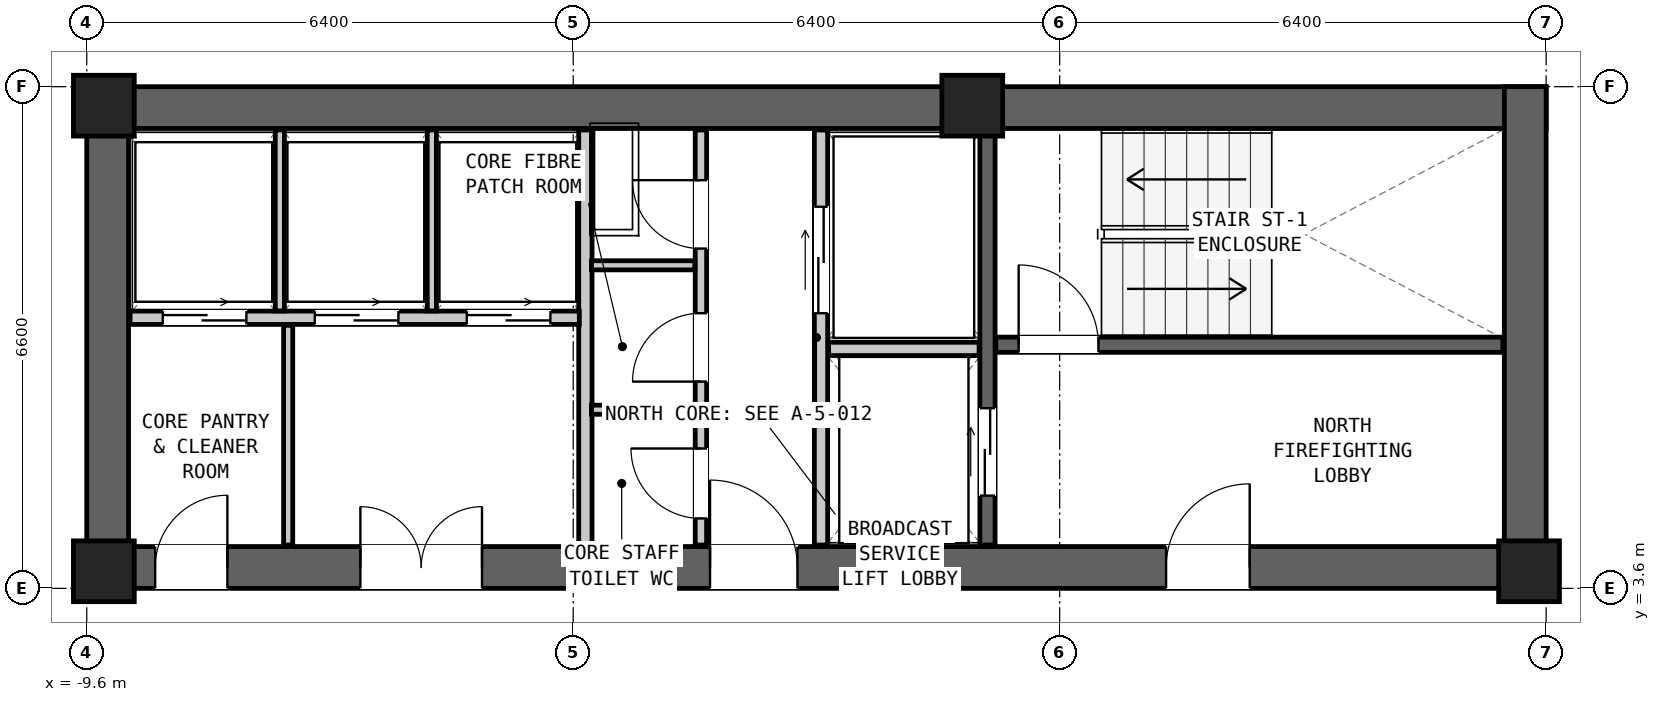
"""IFC4 building model, lengths in metres.
Left out: names, types, materials, properties, quantities, classifications, styles, units other than length and angle.
Written with IfcOpenShell. Run it as: python <this file> out.ifc"""

import sys

from ifc_helpers import new_model, si_unit, direction, frame, frame_2d, origin, origin_2d, place, context, subcontext, project, spatial, rectangle, extrude, element, fill, save


model = new_model("IFC4")
c1 = context("Model", 3, precision=1e-05, world=origin(), true_north=direction((0.0, 1.0)))
c2 = subcontext(c1, "Body", "Model", "MODEL_VIEW")
j1 = project(units=[si_unit("LENGTHUNIT", "METRE"), si_unit("PLANEANGLEUNIT", "RADIAN")], contexts=[c1])
p1 = place(None, origin())
s1 = spatial("IfcSite", under=j1, at=p1, CompositionType="ELEMENT")
p2 = place(p1, origin())
s2 = spatial("IfcBuilding", under=s1, at=p2, CompositionType="ELEMENT")
p3 = place(p2, frame((0.0, 0.0, 35.25)))
s3 = spatial("IfcBuildingStorey", under=s2, at=p3, CompositionType="ELEMENT", Elevation=35.25)
p4 = place(p3, frame((-9.6, 9.925, 0.0), z_axis=(0.0, 0.0, 1.0), x_axis=(1.0, 0.0, 0.0)))
e1 = element("IfcWall", 1, at=p4, inside=s3, PredefinedType="SHEAR", context=c2, shape_type="SweptSolid", body=[
    extrude(rectangle(XDim=19.2, YDim=0.55, at=frame_2d((9.6, 0.0))), origin(), (0.0, 0.0, 1.0), 3.05),
])
p5 = place(p3, frame((-9.6, 3.875, 0.0), z_axis=(0.0, 0.0, 1.0), x_axis=(1.0, 0.0, 0.0)))
e2 = element("IfcWall", 2, at=p5, inside=s3, PredefinedType="SHEAR", context=c2, shape_type="SweptSolid", body=[
    extrude(rectangle(XDim=19.2, YDim=0.55, at=frame_2d((9.6, 0.0))), origin(), (0.0, 0.0, 1.0), 3.05),
])
p6 = place(p5, frame((14.2, 0.0, 0.0)))
e3 = element("IfcOpeningElement", 3, at=p6, cuts=e2, PredefinedType="OPENING", context=c2, shape_type="SweptSolid", body=[
    extrude(rectangle(XDim=1.1, YDim=2.08, at=frame_2d((0.55, 1.04))), frame((0.0, 0.287, 0.0), z_axis=(0.0, -1.0, 0.0), x_axis=(1.0, 0.0, 0.0)), (0.0, 0.0, 1.0), 0.574),
])
p7 = place(p5, frame((8.2, 0.0, 0.0)))
e4 = element("IfcOpeningElement", 4, at=p7, cuts=e2, PredefinedType="OPENING", context=c2, shape_type="SweptSolid", body=[
    extrude(rectangle(XDim=1.15, YDim=2.1, at=frame_2d((0.575, 1.05))), frame((0.0, 0.287, 0.0), z_axis=(0.0, -1.0, 0.0), x_axis=(1.0, 0.0, 0.0)), (0.0, 0.0, 1.0), 0.574),
])
p8 = place(p5, frame((0.9, 0.0, 0.0)))
e5 = element("IfcOpeningElement", 5, at=p8, cuts=e2, PredefinedType="OPENING", context=c2, shape_type="SweptSolid", body=[
    extrude(rectangle(XDim=0.95, YDim=2.1, at=frame_2d((0.475, 1.05))), frame((0.0, 0.287, 0.0), z_axis=(0.0, -1.0, 0.0), x_axis=(1.0, 0.0, 0.0)), (0.0, 0.0, 1.0), 0.574),
])
p9 = place(p5, frame((3.6, 0.0, 0.0)))
e6 = element("IfcOpeningElement", 6, at=p9, cuts=e2, PredefinedType="OPENING", context=c2, shape_type="SweptSolid", body=[
    extrude(rectangle(XDim=1.6, YDim=2.12, at=frame_2d((0.8, 1.06))), frame((0.0, 0.287, 0.0), z_axis=(0.0, -1.0, 0.0), x_axis=(1.0, 0.0, 0.0)), (0.0, 0.0, 1.0), 0.574),
])
for number, where, z_axis, x_axis in (
    (7, (-9.325, 3.6, 0.0), (0.0, 0.0, 1.0), (0.0, 1.0, 0.0)),
    (8, (9.325, 3.6, 0.0), (0.0, 0.0, 1.0), (0.0, 1.0, 0.0)),
):
    element("IfcWall", number, at=place(p3, frame(where, z_axis=z_axis, x_axis=x_axis)), inside=s3, PredefinedType="SHEAR", context=c2, shape_type="SweptSolid", body=[
        extrude(rectangle(XDim=6.6, YDim=0.55, at=frame_2d((3.3, 0.0))), origin(), (0.0, 0.0, 1.0), 3.05),
    ])
for number, where, z_axis, x_axis in (
    (9, (-9.375, 9.95, 0.0), (0.0, 0.0, 1.0), (1.0, 0.0, 0.0)),
    (10, (2.05, 9.95, 0.0), (0.0, 0.0, 1.0), (1.0, 0.0, 0.0)),
    (11, (-9.375, 3.825, 0.0), (0.0, 0.0, 1.0), (1.0, 0.0, 0.0)),
    (12, (9.375, 3.825, 0.0), (0.0, 0.0, 1.0), (1.0, 0.0, 0.0)),
):
    element("IfcColumn", number, at=place(p3, frame(where, z_axis=z_axis, x_axis=x_axis)), inside=s3, PredefinedType="COLUMN", context=c2, shape_type="SweptSolid", body=[
        extrude(rectangle(XDim=0.8, YDim=0.8, at=origin_2d()), origin(), (0.0, 0.0, 1.0), 3.05),
    ])
p10 = place(p3, frame((2.36, 6.805, 0.0), z_axis=(0.0, 0.0, 1.0), x_axis=(1.0, 0.0, 0.0)))
e13 = element("IfcWall", 13, at=p10, inside=s3, PredefinedType="SHEAR", context=c2, shape_type="SweptSolid", body=[
    extrude(rectangle(XDim=6.67, YDim=0.2, at=frame_2d((3.335, 0.0))), origin(), (0.0, 0.0, 1.0), 2.83),
])
p11 = place(p10, frame((0.3, 0.0, 0.0)))
e14 = element("IfcOpeningElement", 14, at=p11, cuts=e13, PredefinedType="OPENING", context=c2, shape_type="SweptSolid", body=[
    extrude(rectangle(XDim=1.05, YDim=2.08, at=frame_2d((0.525, 1.04))), frame((0.0, 0.112, 0.0), z_axis=(0.0, -1.0, 0.0), x_axis=(1.0, 0.0, 0.0)), (0.0, 0.0, 1.0), 0.224),
])
p12 = place(p3, frame((2.25, 4.17, 0.0), z_axis=(0.0, 0.0, 1.0), x_axis=(0.0, 1.0, 0.0)))
e15 = element("IfcWall", 15, at=p12, inside=s3, PredefinedType="SHEAR", context=c2, shape_type="SweptSolid", body=[
    extrude(rectangle(XDim=5.46, YDim=0.2, at=frame_2d((2.73, 0.0))), origin(), (0.0, 0.0, 1.0), 2.83),
])
p13 = place(p12, frame((0.65, 0.0, 0.0)))
e16 = element("IfcOpeningElement", 16, at=p13, cuts=e15, PredefinedType="OPENING", context=c2, shape_type="SweptSolid", body=[
    extrude(rectangle(XDim=1.15, YDim=2.08, at=frame_2d((0.575, 1.04))), frame((0.0, 0.112, 0.0), z_axis=(0.0, -1.0, 0.0), x_axis=(1.0, 0.0, 0.0)), (0.0, 0.0, 1.0), 0.224),
])
p14 = place(p3, frame((0.06, 4.17, 0.0), z_axis=(0.0, 0.0, 1.0), x_axis=(0.0, 1.0, 0.0)))
e17 = element("IfcWall", 17, at=p14, inside=s3, PredefinedType="PARTITIONING", context=c2, shape_type="SweptSolid", body=[
    extrude(rectangle(XDim=5.46, YDim=0.175, at=frame_2d((2.73, 0.0))), origin(), (0.0, 0.0, 1.0), 2.83),
])
p15 = place(p14, frame((3.05, 0.0, 0.0)))
e18 = element("IfcOpeningElement", 18, at=p15, cuts=e17, PredefinedType="OPENING", context=c2, shape_type="SweptSolid", body=[
    extrude(rectangle(XDim=1.4, YDim=2.12, at=frame_2d((0.7, 1.06))), frame((0.0, 0.1, 0.0), z_axis=(0.0, -1.0, 0.0), x_axis=(1.0, 0.0, 0.0)), (0.0, 0.0, 1.0), 0.199),
])
p16 = place(p3, frame((0.16, 6.75, 0.0), z_axis=(0.0, 0.0, 1.0), x_axis=(1.0, 0.0, 0.0)))
e19 = element("IfcWall", 19, at=p16, inside=s3, PredefinedType="PARTITIONING", context=c2, shape_type="SweptSolid", body=[
    extrude(rectangle(XDim=1.98, YDim=0.175, at=frame_2d((0.99, 0.0))), origin(), (0.0, 0.0, 1.0), 2.83),
])
p17 = place(p3, frame((-3.04, 4.17, 0.0), z_axis=(0.0, 0.0, 1.0), x_axis=(0.0, 1.0, 0.0)))
e20 = element("IfcWall", 20, at=p17, inside=s3, PredefinedType="PARTITIONING", context=c2, shape_type="SweptSolid", body=[
    extrude(rectangle(XDim=5.46, YDim=0.175, at=frame_2d((2.73, 0.0))), origin(), (0.0, 0.0, 1.0), 2.83),
])
p18 = place(p3, frame((-1.52, 4.17, 0.0), z_axis=(0.0, 0.0, 1.0), x_axis=(0.0, 1.0, 0.0)))
e21 = element("IfcWall", 21, at=p18, inside=s3, PredefinedType="PARTITIONING", context=c2, shape_type="SweptSolid", body=[
    extrude(rectangle(XDim=5.46, YDim=0.15, at=frame_2d((2.73, 0.0))), origin(), (0.0, 0.0, 1.0), 2.83),
])
p19 = place(p18, frame((3.9, 0.0, 0.0)))
e22 = element("IfcOpeningElement", 22, at=p19, cuts=e21, PredefinedType="OPENING", context=c2, shape_type="SweptSolid", body=[
    extrude(rectangle(XDim=0.9, YDim=2.05, at=frame_2d((0.45, 1.025))), frame((0.0, 0.087, 0.0), z_axis=(0.0, -1.0, 0.0), x_axis=(1.0, 0.0, 0.0)), (0.0, 0.0, 1.0), 0.174),
])
p20 = place(p18, frame((2.15, 0.0, 0.0)))
e23 = element("IfcOpeningElement", 23, at=p20, cuts=e21, PredefinedType="OPENING", context=c2, shape_type="SweptSolid", body=[
    extrude(rectangle(XDim=0.9, YDim=2.05, at=frame_2d((0.45, 1.025))), frame((0.0, 0.087, 0.0), z_axis=(0.0, -1.0, 0.0), x_axis=(1.0, 0.0, 0.0)), (0.0, 0.0, 1.0), 0.174),
])
p21 = place(p18, frame((0.35, 0.0, 0.0)))
e24 = element("IfcOpeningElement", 24, at=p21, cuts=e21, PredefinedType="OPENING", context=c2, shape_type="SweptSolid", body=[
    extrude(rectangle(XDim=0.92, YDim=2.1, at=frame_2d((0.46, 1.05))), frame((0.0, 0.087, 0.0), z_axis=(0.0, -1.0, 0.0), x_axis=(1.0, 0.0, 0.0)), (0.0, 0.0, 1.0), 0.174),
])
for number, where, z_axis, x_axis in (
    (25, (-2.96, 5.95, 0.0), (0.0, 0.0, 1.0), (1.0, 0.0, 0.0)),
    (26, (-2.96, 7.85, 0.0), (0.0, 0.0, 1.0), (1.0, 0.0, 0.0)),
):
    element("IfcWall", number, at=place(p3, frame(where, z_axis=z_axis, x_axis=x_axis)), inside=s3, PredefinedType="PARTITIONING", context=c2, shape_type="SweptSolid", body=[
        extrude(rectangle(XDim=1.36, YDim=0.12, at=frame_2d((0.68, 0.0))), origin(), (0.0, 0.0, 1.0), 2.83),
    ])
p22 = place(p3, frame((-9.03, 7.16, 0.0), z_axis=(0.0, 0.0, 1.0), x_axis=(1.0, 0.0, 0.0)))
e27 = element("IfcWall", 27, at=p22, inside=s3, PredefinedType="PARTITIONING", context=c2, shape_type="SweptSolid", body=[
    extrude(rectangle(XDim=5.91, YDim=0.175, at=frame_2d((2.955, 0.0))), origin(), (0.0, 0.0, 1.0), 2.83),
])
p23 = place(p22, frame((0.43, 0.0, 0.0)))
e28 = element("IfcOpeningElement", 28, at=p23, cuts=e27, PredefinedType="OPENING", context=c2, shape_type="SweptSolid", body=[
    extrude(rectangle(XDim=1.1, YDim=2.06, at=frame_2d((0.55, 1.03))), frame((0.0, 0.1, 0.0), z_axis=(0.0, -1.0, 0.0), x_axis=(1.0, 0.0, 0.0)), (0.0, 0.0, 1.0), 0.199),
])
p24 = place(p22, frame((2.43, 0.0, 0.0)))
e29 = element("IfcOpeningElement", 29, at=p24, cuts=e27, PredefinedType="OPENING", context=c2, shape_type="SweptSolid", body=[
    extrude(rectangle(XDim=1.1, YDim=2.06, at=frame_2d((0.55, 1.03))), frame((0.0, 0.1, 0.0), z_axis=(0.0, -1.0, 0.0), x_axis=(1.0, 0.0, 0.0)), (0.0, 0.0, 1.0), 0.199),
])
p25 = place(p22, frame((4.43, 0.0, 0.0)))
e30 = element("IfcOpeningElement", 30, at=p25, cuts=e27, PredefinedType="OPENING", context=c2, shape_type="SweptSolid", body=[
    extrude(rectangle(XDim=1.1, YDim=2.06, at=frame_2d((0.55, 1.03))), frame((0.0, 0.1, 0.0), z_axis=(0.0, -1.0, 0.0), x_axis=(1.0, 0.0, 0.0)), (0.0, 0.0, 1.0), 0.199),
])
for number, where, z_axis, x_axis in (
    (31, (-7.06, 7.25, 0.0), (0.0, 0.0, 1.0), (0.0, 1.0, 0.0)),
    (32, (-5.06, 7.25, 0.0), (0.0, 0.0, 1.0), (0.0, 1.0, 0.0)),
):
    element("IfcWall", number, at=place(p3, frame(where, z_axis=z_axis, x_axis=x_axis)), inside=s3, PredefinedType="PARTITIONING", context=c2, shape_type="SweptSolid", body=[
        extrude(rectangle(XDim=2.38, YDim=0.12, at=frame_2d((1.19, 0.0))), origin(), (0.0, 0.0, 1.0), 2.83),
    ])
p26 = place(p3, frame((-6.95, 4.17, 0.0), z_axis=(0.0, 0.0, 1.0), x_axis=(0.0, 1.0, 0.0)))
e33 = element("IfcWall", 33, at=p26, inside=s3, PredefinedType="PARTITIONING", context=c2, shape_type="SweptSolid", body=[
    extrude(rectangle(XDim=2.89, YDim=0.12, at=frame_2d((1.445, 0.0))), origin(), (0.0, 0.0, 1.0), 2.83),
])
p27 = place(p11, origin())
e34 = element("IfcDoor", 34, at=p27, inside=s3, OperationType="SINGLE_SWING_LEFT", PredefinedType="DOOR", context=c2, shape_type="SweptSolid", body=[
    extrude(rectangle(XDim=1.05, YDim=2.08, at=frame_2d((0.525, 1.04))), frame((0.0, 0.025, 0.0), z_axis=(0.0, -1.0, 0.0), x_axis=(1.0, 0.0, 0.0)), (0.0, 0.0, 1.0), 0.05),
])
fill(e14, e34)
p28 = place(p6, origin())
e35 = element("IfcDoor", 35, at=p28, inside=s3, OperationType="SINGLE_SWING_RIGHT", PredefinedType="DOOR", context=c2, shape_type="SweptSolid", body=[
    extrude(rectangle(XDim=1.1, YDim=2.08, at=frame_2d((0.55, 1.04))), frame((0.0, 0.025, 0.0), z_axis=(0.0, -1.0, 0.0), x_axis=(1.0, 0.0, 0.0)), (0.0, 0.0, 1.0), 0.05),
])
fill(e3, e35)
p29 = place(p13, origin())
e36 = element("IfcDoor", 36, at=p29, inside=s3, OperationType="DOUBLE_DOOR_SLIDING", PredefinedType="DOOR", context=c2, shape_type="SweptSolid", body=[
    extrude(rectangle(XDim=1.15, YDim=2.08, at=frame_2d((0.575, 1.04))), frame((0.0, 0.025, 0.0), z_axis=(0.0, -1.0, 0.0), x_axis=(1.0, 0.0, 0.0)), (0.0, 0.0, 1.0), 0.05),
])
fill(e16, e36)
p30 = place(p15, origin())
e37 = element("IfcDoor", 37, at=p30, inside=s3, OperationType="DOUBLE_DOOR_SLIDING", PredefinedType="DOOR", context=c2, shape_type="SweptSolid", body=[
    extrude(rectangle(XDim=1.4, YDim=2.12, at=frame_2d((0.7, 1.06))), frame((0.0, 0.025, 0.0), z_axis=(0.0, -1.0, 0.0), x_axis=(1.0, 0.0, 0.0)), (0.0, 0.0, 1.0), 0.05),
])
fill(e18, e37)
p31 = place(p7, origin())
e38 = element("IfcDoor", 38, at=p31, inside=s3, OperationType="SINGLE_SWING_LEFT", PredefinedType="DOOR", context=c2, shape_type="SweptSolid", body=[
    extrude(rectangle(XDim=1.15, YDim=2.1, at=frame_2d((0.575, 1.05))), frame((0.0, 0.025, 0.0), z_axis=(0.0, -1.0, 0.0), x_axis=(1.0, 0.0, 0.0)), (0.0, 0.0, 1.0), 0.05),
])
fill(e4, e38)
p32 = place(p19, origin())
e39 = element("IfcDoor", 39, at=p32, inside=s3, OperationType="SINGLE_SWING_RIGHT", PredefinedType="DOOR", context=c2, shape_type="SweptSolid", body=[
    extrude(rectangle(XDim=0.9, YDim=2.05, at=frame_2d((0.45, 1.025))), frame((0.0, 0.025, 0.0), z_axis=(0.0, -1.0, 0.0), x_axis=(1.0, 0.0, 0.0)), (0.0, 0.0, 1.0), 0.05),
])
fill(e22, e39)
p33 = place(p20, origin())
e40 = element("IfcDoor", 40, at=p33, inside=s3, OperationType="SINGLE_SWING_LEFT", PredefinedType="DOOR", context=c2, shape_type="SweptSolid", body=[
    extrude(rectangle(XDim=0.9, YDim=2.05, at=frame_2d((0.45, 1.025))), frame((0.0, 0.025, 0.0), z_axis=(0.0, -1.0, 0.0), x_axis=(1.0, 0.0, 0.0)), (0.0, 0.0, 1.0), 0.05),
])
fill(e23, e40)
p34 = place(p21, origin())
e41 = element("IfcDoor", 41, at=p34, inside=s3, OperationType="SINGLE_SWING_RIGHT", PredefinedType="DOOR", context=c2, shape_type="SweptSolid", body=[
    extrude(rectangle(XDim=0.92, YDim=2.1, at=frame_2d((0.46, 1.05))), frame((0.0, 0.025, 0.0), z_axis=(0.0, -1.0, 0.0), x_axis=(1.0, 0.0, 0.0)), (0.0, 0.0, 1.0), 0.05),
])
fill(e24, e41)
p35 = place(p23, origin())
e42 = element("IfcDoor", 42, at=p35, inside=s3, OperationType="DOUBLE_DOOR_SLIDING", PredefinedType="DOOR", context=c2, shape_type="SweptSolid", body=[
    extrude(rectangle(XDim=1.1, YDim=2.06, at=frame_2d((0.55, 1.03))), frame((0.0, 0.025, 0.0), z_axis=(0.0, -1.0, 0.0), x_axis=(1.0, 0.0, 0.0)), (0.0, 0.0, 1.0), 0.05),
])
fill(e28, e42)
p36 = place(p24, origin())
e43 = element("IfcDoor", 43, at=p36, inside=s3, OperationType="DOUBLE_DOOR_SLIDING", PredefinedType="DOOR", context=c2, shape_type="SweptSolid", body=[
    extrude(rectangle(XDim=1.1, YDim=2.06, at=frame_2d((0.55, 1.03))), frame((0.0, 0.025, 0.0), z_axis=(0.0, -1.0, 0.0), x_axis=(1.0, 0.0, 0.0)), (0.0, 0.0, 1.0), 0.05),
])
fill(e29, e43)
p37 = place(p25, origin())
e44 = element("IfcDoor", 44, at=p37, inside=s3, OperationType="DOUBLE_DOOR_SLIDING", PredefinedType="DOOR", context=c2, shape_type="SweptSolid", body=[
    extrude(rectangle(XDim=1.1, YDim=2.06, at=frame_2d((0.55, 1.03))), frame((0.0, 0.025, 0.0), z_axis=(0.0, -1.0, 0.0), x_axis=(1.0, 0.0, 0.0)), (0.0, 0.0, 1.0), 0.05),
])
fill(e30, e44)
p38 = place(p8, origin())
e45 = element("IfcDoor", 45, at=p38, inside=s3, OperationType="SINGLE_SWING_RIGHT", PredefinedType="DOOR", context=c2, shape_type="SweptSolid", body=[
    extrude(rectangle(XDim=0.95, YDim=2.1, at=frame_2d((0.475, 1.05))), frame((0.0, 0.025, 0.0), z_axis=(0.0, -1.0, 0.0), x_axis=(1.0, 0.0, 0.0)), (0.0, 0.0, 1.0), 0.05),
])
fill(e5, e45)
p39 = place(p9, origin())
e46 = element("IfcDoor", 46, at=p39, inside=s3, OperationType="DOUBLE_DOOR_SINGLE_SWING", PredefinedType="DOOR", context=c2, shape_type="SweptSolid", body=[
    extrude(rectangle(XDim=1.6, YDim=2.12, at=frame_2d((0.8, 1.06))), frame((0.0, 0.025, 0.0), z_axis=(0.0, -1.0, 0.0), x_axis=(1.0, 0.0, 0.0)), (0.0, 0.0, 1.0), 0.05),
])
fill(e6, e46)
save(model, sys.argv[1])
